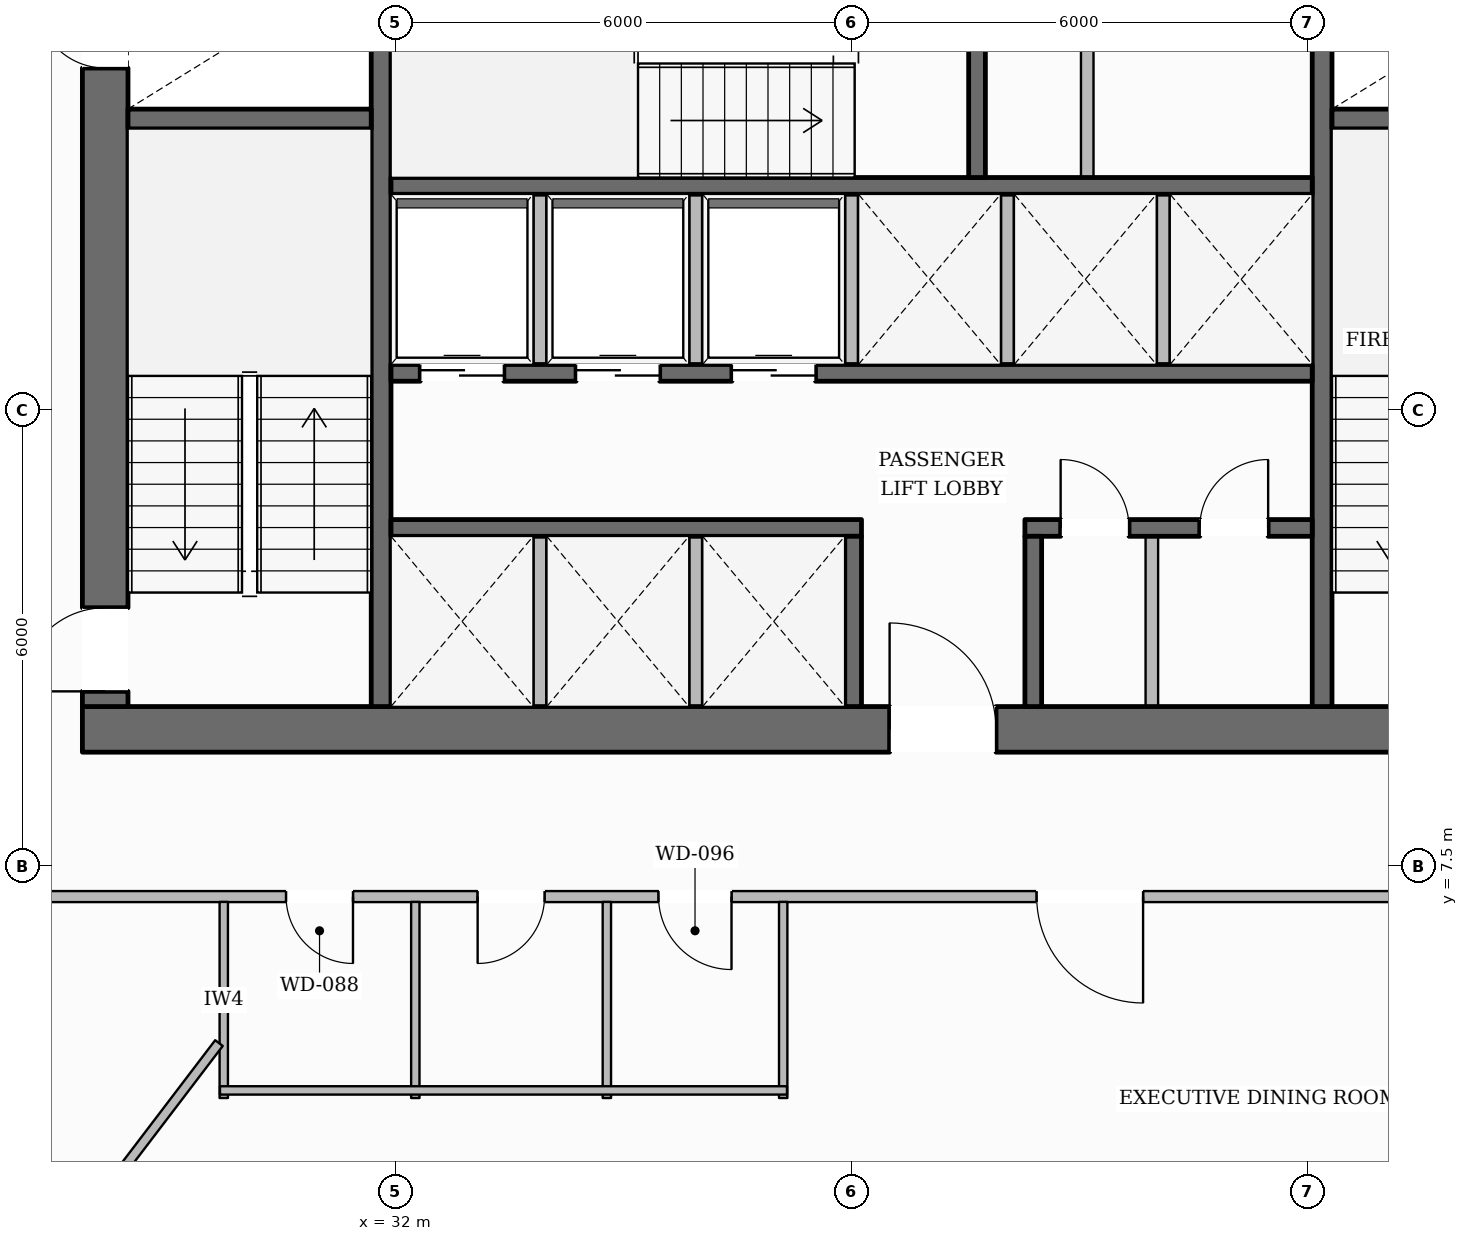
"""IFC4 building model, lengths in metres.
Left out: names, types, materials, properties, quantities, classifications, styles, units other than length and angle.
Written with IfcOpenShell. Run it as: python <this file> out.ifc"""

import sys

from ifc_helpers import new_model, si_unit, direction, frame, frame_2d, origin, place, context, subcontext, project, spatial, rectangle, extrude, element, fill, save


model = new_model("IFC4")
c1 = context("Model", 3, precision=1e-05, world=origin(), true_north=direction((0.0, 1.0)))
c2 = subcontext(c1, "Body", "Model", "MODEL_VIEW")
j1 = project(units=[si_unit("LENGTHUNIT", "METRE"), si_unit("PLANEANGLEUNIT", "RADIAN")], contexts=[c1])
p1 = place(None, origin())
s1 = spatial("IfcSite", under=j1, at=p1, CompositionType="ELEMENT")
p2 = place(p1, origin())
s2 = spatial("IfcBuilding", under=s1, at=p2, CompositionType="ELEMENT")
p3 = place(p2, frame((0.0, 0.0, 48.35)))
s3 = spatial("IfcBuildingStorey", under=s2, at=p3, CompositionType="ELEMENT", Elevation=48.35)
p4 = place(p3, frame((27.88, 9.3, 0.0), z_axis=(0.0, 0.0, 1.0), x_axis=(1.0, 0.0, 0.0)))
e1 = element("IfcWall", 1, at=p4, inside=s3, PredefinedType="SOLIDWALL", context=c2, shape_type="SweptSolid", body=[
    extrude(rectangle(XDim=20.24, YDim=0.6, at=frame_2d((10.12, 0.0))), origin(), (0.0, 0.0, 1.0), 3.59),
])
p5 = place(p4, frame((10.62, 0.0, 0.0)))
e2 = element("IfcOpeningElement", 2, at=p5, cuts=e1, PredefinedType="OPENING", context=c2, shape_type="SweptSolid", body=[
    extrude(rectangle(XDim=1.4, YDim=2.2, at=frame_2d((0.7, 1.1))), frame((0.0, 0.31, 0.0), z_axis=(0.0, -1.0, 0.0), x_axis=(1.0, 0.0, 0.0)), (0.0, 0.0, 1.0), 0.62),
])
p6 = place(p3, frame((28.18, 9.6, 0.0), z_axis=(0.0, 0.0, 1.0), x_axis=(0.0, 1.0, 0.0)))
e3 = element("IfcWall", 3, at=p6, inside=s3, PredefinedType="SOLIDWALL", context=c2, shape_type="SweptSolid", body=[
    extrude(rectangle(XDim=13.0, YDim=0.6, at=frame_2d((6.5, 0.0))), origin(), (0.0, 0.0, 1.0), 3.59),
])
p7 = place(p6, frame((0.2, 0.0, 0.0)))
e4 = element("IfcOpeningElement", 4, at=p7, cuts=e3, PredefinedType="OPENING", context=c2, shape_type="SweptSolid", body=[
    extrude(rectangle(XDim=1.1, YDim=2.15, at=frame_2d((0.55, 1.075))), frame((0.0, 0.31, 0.0), z_axis=(0.0, -1.0, 0.0), x_axis=(1.0, 0.0, 0.0)), (0.0, 0.0, 1.0), 0.62),
])
p8 = place(p6, frame((8.4, 0.0, 0.0)))
e5 = element("IfcOpeningElement", 5, at=p8, cuts=e3, PredefinedType="OPENING", context=c2, shape_type="SweptSolid", body=[
    extrude(rectangle(XDim=0.9, YDim=2.1, at=frame_2d((0.45, 1.05))), frame((0.0, 0.31, 0.0), z_axis=(0.0, -1.0, 0.0), x_axis=(1.0, 0.0, 0.0)), (0.0, 0.0, 1.0), 0.62),
])
p9 = place(p3, frame((31.81, 9.6, 0.0), z_axis=(0.0, 0.0, 1.0), x_axis=(0.0, 1.0, 0.0)))
e6 = element("IfcWall", 6, at=p9, inside=s3, PredefinedType="SHEAR", context=c2, shape_type="SweptSolid", body=[
    extrude(rectangle(XDim=13.0, YDim=0.26, at=frame_2d((6.5, 0.0))), origin(), (0.0, 0.0, 1.0), 3.59),
])
p10 = place(p9, frame((10.925, 0.0, 0.0)))
e7 = element("IfcOpeningElement", 7, at=p10, cuts=e6, PredefinedType="OPENING", context=c2, shape_type="SweptSolid", body=[
    extrude(rectangle(XDim=1.25, YDim=2.25, at=frame_2d((0.625, 1.125))), frame((0.0, 0.14, 0.0), z_axis=(0.0, -1.0, 0.0), x_axis=(1.0, 0.0, 0.0)), (0.0, 0.0, 1.0), 0.28),
])
p11 = place(p3, frame((44.19, 9.6, 0.0), z_axis=(0.0, 0.0, 1.0), x_axis=(0.0, 1.0, 0.0)))
e8 = element("IfcWall", 8, at=p11, inside=s3, PredefinedType="SHEAR", context=c2, shape_type="SweptSolid", body=[
    extrude(rectangle(XDim=13.0, YDim=0.26, at=frame_2d((6.5, 0.0))), origin(), (0.0, 0.0, 1.0), 3.59),
])
p12 = place(p11, frame((10.925, 0.0, 0.0)))
e9 = element("IfcOpeningElement", 9, at=p12, cuts=e8, PredefinedType="OPENING", context=c2, shape_type="SweptSolid", body=[
    extrude(rectangle(XDim=1.25, YDim=2.25, at=frame_2d((0.625, 1.125))), frame((0.0, 0.14, 0.0), z_axis=(0.0, -1.0, 0.0), x_axis=(1.0, 0.0, 0.0)), (0.0, 0.0, 1.0), 0.28),
])
for number, where, z_axis, x_axis in (
    (10, (28.48, 17.33, 0.0), (0.0, 0.0, 1.0), (1.0, 0.0, 0.0)),
    (11, (44.32, 17.33, 0.0), (0.0, 0.0, 1.0), (1.0, 0.0, 0.0)),
):
    element("IfcWall", number, at=place(p3, frame(where, z_axis=z_axis, x_axis=x_axis)), inside=s3, PredefinedType="SHEAR", context=c2, shape_type="SweptSolid", body=[
        extrude(rectangle(XDim=3.2, YDim=0.26, at=frame_2d((1.6, 0.0))), origin(), (0.0, 0.0, 1.0), 3.59),
    ])
p13 = place(p3, frame((31.94, 16.45, 0.0), z_axis=(0.0, 0.0, 1.0), x_axis=(1.0, 0.0, 0.0)))
e12 = element("IfcWall", 12, at=p13, inside=s3, PredefinedType="SOLIDWALL", context=c2, shape_type="SweptSolid", body=[
    extrude(rectangle(XDim=12.12, YDim=0.22, at=frame_2d((6.06, 0.0))), origin(), (0.0, 0.0, 1.0), 3.59),
])
p14 = place(p3, frame((39.65, 16.56, 0.0), z_axis=(0.0, 0.0, 1.0), x_axis=(0.0, 1.0, 0.0)))
e13 = element("IfcWall", 13, at=p14, inside=s3, PredefinedType="SOLIDWALL", context=c2, shape_type="SweptSolid", body=[
    extrude(rectangle(XDim=3.2, YDim=0.22, at=frame_2d((1.6, 0.0))), origin(), (0.0, 0.0, 1.0), 3.59),
])
p15 = place(p3, frame((31.94, 13.99, 0.0), z_axis=(0.0, 0.0, 1.0), x_axis=(1.0, 0.0, 0.0)))
e14 = element("IfcWall", 14, at=p15, inside=s3, PredefinedType="SOLIDWALL", context=c2, shape_type="SweptSolid", body=[
    extrude(rectangle(XDim=12.12, YDim=0.22, at=frame_2d((6.06, 0.0))), origin(), (0.0, 0.0, 1.0), 3.59),
])
p16 = place(p15, frame((0.385, 0.0, 0.0)))
e15 = element("IfcOpeningElement", 15, at=p16, cuts=e14, PredefinedType="OPENING", context=c2, shape_type="SweptSolid", body=[
    extrude(rectangle(XDim=1.1, YDim=2.2, at=frame_2d((0.55, 1.1))), frame((0.0, 0.12, 0.0), z_axis=(0.0, -1.0, 0.0), x_axis=(1.0, 0.0, 0.0)), (0.0, 0.0, 1.0), 0.24),
])
p17 = place(p15, frame((2.435, 0.0, 0.0)))
e16 = element("IfcOpeningElement", 16, at=p17, cuts=e14, PredefinedType="OPENING", context=c2, shape_type="SweptSolid", body=[
    extrude(rectangle(XDim=1.1, YDim=2.2, at=frame_2d((0.55, 1.1))), frame((0.0, 0.12, 0.0), z_axis=(0.0, -1.0, 0.0), x_axis=(1.0, 0.0, 0.0)), (0.0, 0.0, 1.0), 0.24),
])
p18 = place(p15, frame((4.485, 0.0, 0.0)))
e17 = element("IfcOpeningElement", 17, at=p18, cuts=e14, PredefinedType="OPENING", context=c2, shape_type="SweptSolid", body=[
    extrude(rectangle(XDim=1.1, YDim=2.2, at=frame_2d((0.55, 1.1))), frame((0.0, 0.12, 0.0), z_axis=(0.0, -1.0, 0.0), x_axis=(1.0, 0.0, 0.0)), (0.0, 0.0, 1.0), 0.24),
])
p19 = place(p3, frame((31.94, 11.95, 0.0), z_axis=(0.0, 0.0, 1.0), x_axis=(1.0, 0.0, 0.0)))
e18 = element("IfcWall", 18, at=p19, inside=s3, PredefinedType="SOLIDWALL", context=c2, shape_type="SweptSolid", body=[
    extrude(rectangle(XDim=6.19, YDim=0.22, at=frame_2d((3.095, 0.0))), origin(), (0.0, 0.0, 1.0), 3.59),
])
p20 = place(p3, frame((40.28, 11.95, 0.0), z_axis=(0.0, 0.0, 1.0), x_axis=(1.0, 0.0, 0.0)))
e19 = element("IfcWall", 19, at=p20, inside=s3, PredefinedType="SOLIDWALL", context=c2, shape_type="SweptSolid", body=[
    extrude(rectangle(XDim=3.78, YDim=0.22, at=frame_2d((1.89, 0.0))), origin(), (0.0, 0.0, 1.0), 3.59),
])
p21 = place(p20, frame((0.47, 0.0, 0.0)))
e20 = element("IfcOpeningElement", 20, at=p21, cuts=e19, PredefinedType="OPENING", context=c2, shape_type="SweptSolid", body=[
    extrude(rectangle(XDim=0.9, YDim=2.1, at=frame_2d((0.45, 1.05))), frame((0.0, 0.12, 0.0), z_axis=(0.0, -1.0, 0.0), x_axis=(1.0, 0.0, 0.0)), (0.0, 0.0, 1.0), 0.24),
])
p22 = place(p20, frame((2.3, 0.0, 0.0)))
e21 = element("IfcOpeningElement", 21, at=p22, cuts=e19, PredefinedType="OPENING", context=c2, shape_type="SweptSolid", body=[
    extrude(rectangle(XDim=0.9, YDim=2.1, at=frame_2d((0.45, 1.05))), frame((0.0, 0.12, 0.0), z_axis=(0.0, -1.0, 0.0), x_axis=(1.0, 0.0, 0.0)), (0.0, 0.0, 1.0), 0.24),
])
for number, where, z_axis, x_axis in (
    (22, (38.02, 9.6, 0.0), (0.0, 0.0, 1.0), (0.0, 1.0, 0.0)),
    (23, (40.39, 9.6, 0.0), (0.0, 0.0, 1.0), (0.0, 1.0, 0.0)),
):
    element("IfcWall", number, at=place(p3, frame(where, z_axis=z_axis, x_axis=x_axis)), inside=s3, PredefinedType="SOLIDWALL", context=c2, shape_type="SweptSolid", body=[
        extrude(rectangle(XDim=2.24, YDim=0.22, at=frame_2d((1.12, 0.0))), origin(), (0.0, 0.0, 1.0), 3.59),
    ])
p23 = place(p3, frame((13.156, 14.237, 0.0), z_axis=(0.0, 0.0, 1.0), x_axis=(0.499310189151, 0.866423300131, 0.0)))
e24 = element("IfcWall", 24, at=p23, inside=s3, PredefinedType="STANDARD", context=c2, shape_type="SweptSolid", body=[
    extrude(rectangle(XDim=34.917, YDim=0.38, at=frame_2d((17.458, 0.0))), origin(), (0.0, 0.0, 1.0), 2.97),
])
p24 = place(p23, frame((25.588, 0.0, 0.0)))
e25 = element("IfcOpeningElement", 25, at=p24, cuts=e24, PredefinedType="OPENING", context=c2, shape_type="SweptSolid", body=[
    extrude(rectangle(XDim=1.0, YDim=2.2, at=frame_2d((0.5, 1.1))), frame((0.0, 0.2, 0.0), z_axis=(0.0, -1.0, 0.0), x_axis=(1.0, 0.0, 0.0)), (0.0, 0.0, 1.0), 0.4),
])
p25 = place(p23, frame((30.783, 0.0, 0.65)))
e26 = element("IfcOpeningElement", 26, at=p25, cuts=e24, PredefinedType="OPENING", context=c2, shape_type="SweptSolid", body=[
    extrude(rectangle(XDim=1.65, YDim=1.75, at=frame_2d((0.825, 0.875))), frame((0.0, 0.2, 0.0), z_axis=(0.0, -1.0, 0.0), x_axis=(1.0, 0.0, 0.0)), (0.0, 0.0, 1.0), 0.4),
])
p26 = place(p23, frame((8.143, 0.0, 0.65)))
e27 = element("IfcOpeningElement", 27, at=p26, cuts=e24, PredefinedType="OPENING", context=c2, shape_type="SweptSolid", body=[
    extrude(rectangle(XDim=1.65, YDim=1.75, at=frame_2d((0.825, 0.875))), frame((0.0, 0.2, 0.0), z_axis=(0.0, -1.0, 0.0), x_axis=(1.0, 0.0, 0.0)), (0.0, 0.0, 1.0), 0.4),
])
p27 = place(p23, frame((2.483, 0.0, 0.65)))
e28 = element("IfcOpeningElement", 28, at=p27, cuts=e24, PredefinedType="OPENING", context=c2, shape_type="SweptSolid", body=[
    extrude(rectangle(XDim=1.65, YDim=1.75, at=frame_2d((0.825, 0.875))), frame((0.0, 0.2, 0.0), z_axis=(0.0, -1.0, 0.0), x_axis=(1.0, 0.0, 0.0)), (0.0, 0.0, 1.0), 0.4),
])
for number, where, z_axis, x_axis in (
    (29, (33.9, 9.6, 0.0), (0.0, 0.0, 1.0), (0.0, 1.0, 0.0)),
    (30, (35.95, 9.6, 0.0), (0.0, 0.0, 1.0), (0.0, 1.0, 0.0)),
    (31, (33.9, 14.1, 0.0), (0.0, 0.0, 1.0), (0.0, 1.0, 0.0)),
    (32, (35.95, 14.1, 0.0), (0.0, 0.0, 1.0), (0.0, 1.0, 0.0)),
    (33, (38.0, 14.1, 0.0), (0.0, 0.0, 1.0), (0.0, 1.0, 0.0)),
    (34, (40.05, 14.1, 0.0), (0.0, 0.0, 1.0), (0.0, 1.0, 0.0)),
    (35, (42.1, 14.1, 0.0), (0.0, 0.0, 1.0), (0.0, 1.0, 0.0)),
):
    element("IfcWall", number, at=place(p3, frame(where, z_axis=z_axis, x_axis=x_axis)), inside=s3, PredefinedType="PARTITIONING", context=c2, shape_type="SweptSolid", body=[
        extrude(rectangle(XDim=2.24, YDim=0.165, at=frame_2d((1.12, 0.0))), origin(), (0.0, 0.0, 1.0), 3.59),
    ])
p28 = place(p3, frame((41.1, 16.56, 0.0), z_axis=(0.0, 0.0, 1.0), x_axis=(0.0, 1.0, 0.0)))
e36 = element("IfcWall", 36, at=p28, inside=s3, PredefinedType="PARTITIONING", context=c2, shape_type="SweptSolid", body=[
    extrude(rectangle(XDim=3.2, YDim=0.165, at=frame_2d((1.6, 0.0))), origin(), (0.0, 0.0, 1.0), 3.59),
])
p29 = place(p3, frame((41.95, 9.6, 0.0), z_axis=(0.0, 0.0, 1.0), x_axis=(0.0, 1.0, 0.0)))
e37 = element("IfcWall", 37, at=p29, inside=s3, PredefinedType="PARTITIONING", context=c2, shape_type="SweptSolid", body=[
    extrude(rectangle(XDim=2.24, YDim=0.165, at=frame_2d((1.12, 0.0))), origin(), (0.0, 0.0, 1.0), 3.59),
])
p30 = place(p3, frame((49.92, 7.1, 0.0), z_axis=(0.0, 0.0, 1.0), x_axis=(-1.0, 0.0, 0.0)))
e38 = element("IfcWall", 38, at=p30, inside=s3, PredefinedType="PARTITIONING", context=c2, shape_type="SweptSolid", body=[
    extrude(rectangle(XDim=23.84, YDim=0.145, at=frame_2d((11.92, 0.0))), origin(), (0.0, 0.0, 1.0), 3.278),
])
p31 = place(p30, frame((18.48, 0.0, 0.0)))
e39 = element("IfcOpeningElement", 39, at=p31, cuts=e38, PredefinedType="OPENING", context=c2, shape_type="SweptSolid", body=[
    extrude(rectangle(XDim=0.88, YDim=2.1, at=frame_2d((0.44, 1.05))), frame((0.0, 0.083, 0.0), z_axis=(0.0, -1.0, 0.0), x_axis=(1.0, 0.0, 0.0)), (0.0, 0.0, 1.0), 0.165),
])
p32 = place(p30, frame((15.96, 0.0, 0.0)))
e40 = element("IfcOpeningElement", 40, at=p32, cuts=e38, PredefinedType="OPENING", context=c2, shape_type="SweptSolid", body=[
    extrude(rectangle(XDim=0.88, YDim=2.1, at=frame_2d((0.44, 1.05))), frame((0.0, 0.083, 0.0), z_axis=(0.0, -1.0, 0.0), x_axis=(1.0, 0.0, 0.0)), (0.0, 0.0, 1.0), 0.165),
])
p33 = place(p30, frame((13.5, 0.0, 0.0)))
e41 = element("IfcOpeningElement", 41, at=p33, cuts=e38, PredefinedType="OPENING", context=c2, shape_type="SweptSolid", body=[
    extrude(rectangle(XDim=0.96, YDim=2.1, at=frame_2d((0.48, 1.05))), frame((0.0, 0.083, 0.0), z_axis=(0.0, -1.0, 0.0), x_axis=(1.0, 0.0, 0.0)), (0.0, 0.0, 1.0), 0.165),
])
p34 = place(p30, frame((8.085, 0.0, 0.0)))
e42 = element("IfcOpeningElement", 42, at=p34, cuts=e38, PredefinedType="OPENING", context=c2, shape_type="SweptSolid", body=[
    extrude(rectangle(XDim=1.4, YDim=2.2, at=frame_2d((0.7, 1.1))), frame((0.0, 0.083, 0.0), z_axis=(0.0, -1.0, 0.0), x_axis=(1.0, 0.0, 0.0)), (0.0, 0.0, 1.0), 0.165),
])
for number, where, z_axis, x_axis in (
    (43, (29.74, 4.45, 0.0), (0.0, 0.0, 1.0), (0.0, 1.0, 0.0)),
    (44, (32.26, 4.45, 0.0), (0.0, 0.0, 1.0), (0.0, 1.0, 0.0)),
    (45, (34.78, 4.45, 0.0), (0.0, 0.0, 1.0), (0.0, 1.0, 0.0)),
    (46, (37.1, 4.45, 0.0), (0.0, 0.0, 1.0), (0.0, 1.0, 0.0)),
):
    element("IfcWall", number, at=place(p3, frame(where, z_axis=z_axis, x_axis=x_axis)), inside=s3, PredefinedType="PLUMBINGWALL", context=c2, shape_type="SweptSolid", body=[
        extrude(rectangle(XDim=2.58, YDim=0.11, at=frame_2d((1.29, 0.0))), origin(), (0.0, 0.0, 1.0), 3.59),
    ])
p35 = place(p3, frame((29.69, 4.55, 0.0), z_axis=(0.0, 0.0, 1.0), x_axis=(1.0, 0.0, 0.0)))
e47 = element("IfcWall", 47, at=p35, inside=s3, PredefinedType="PLUMBINGWALL", context=c2, shape_type="SweptSolid", body=[
    extrude(rectangle(XDim=7.46, YDim=0.11, at=frame_2d((3.73, 0.0))), origin(), (0.0, 0.0, 1.0), 3.59),
])
p36 = place(p3, frame((29.677, 5.173, 0.0), z_axis=(0.0, 0.0, 1.0), x_axis=(-0.605925707835, -0.795521235785, 0.0)))
e48 = element("IfcWall", 48, at=p36, inside=s3, PredefinedType="PARTITIONING", context=c2, shape_type="SweptSolid", body=[
    extrude(rectangle(XDim=4.069, YDim=0.125, at=frame_2d((2.035, 0.0))), origin(), (0.0, 0.0, 1.0), 3.59),
])
p37 = place(p7, origin())
e49 = element("IfcDoor", 49, at=p37, inside=s3, OperationType="SINGLE_SWING_LEFT", PredefinedType="DOOR", context=c2, shape_type="SweptSolid", body=[
    extrude(rectangle(XDim=1.1, YDim=2.15, at=frame_2d((0.55, 1.075))), frame((0.0, 0.025, 0.0), z_axis=(0.0, -1.0, 0.0), x_axis=(1.0, 0.0, 0.0)), (0.0, 0.0, 1.0), 0.05),
])
fill(e4, e49)
p38 = place(p8, origin())
e50 = element("IfcDoor", 50, at=p38, inside=s3, OperationType="SINGLE_SWING_RIGHT", PredefinedType="DOOR", context=c2, shape_type="SweptSolid", body=[
    extrude(rectangle(XDim=0.9, YDim=2.1, at=frame_2d((0.45, 1.05))), frame((0.0, 0.025, 0.0), z_axis=(0.0, -1.0, 0.0), x_axis=(1.0, 0.0, 0.0)), (0.0, 0.0, 1.0), 0.05),
])
fill(e5, e50)
p39 = place(p5, origin())
e51 = element("IfcDoor", 51, at=p39, inside=s3, OperationType="SINGLE_SWING_LEFT", PredefinedType="DOOR", context=c2, shape_type="SweptSolid", body=[
    extrude(rectangle(XDim=1.4, YDim=2.2, at=frame_2d((0.7, 1.1))), frame((0.0, 0.025, 0.0), z_axis=(0.0, -1.0, 0.0), x_axis=(1.0, 0.0, 0.0)), (0.0, 0.0, 1.0), 0.05),
])
fill(e2, e51)
p40 = place(p16, origin())
e52 = element("IfcDoor", 52, at=p40, inside=s3, OperationType="DOUBLE_DOOR_SLIDING", PredefinedType="DOOR", context=c2, shape_type="SweptSolid", body=[
    extrude(rectangle(XDim=1.1, YDim=2.2, at=frame_2d((0.55, 1.1))), frame((0.0, 0.025, 0.0), z_axis=(0.0, -1.0, 0.0), x_axis=(1.0, 0.0, 0.0)), (0.0, 0.0, 1.0), 0.05),
])
fill(e15, e52)
p41 = place(p17, origin())
e53 = element("IfcDoor", 53, at=p41, inside=s3, OperationType="DOUBLE_DOOR_SLIDING", PredefinedType="DOOR", context=c2, shape_type="SweptSolid", body=[
    extrude(rectangle(XDim=1.1, YDim=2.2, at=frame_2d((0.55, 1.1))), frame((0.0, 0.025, 0.0), z_axis=(0.0, -1.0, 0.0), x_axis=(1.0, 0.0, 0.0)), (0.0, 0.0, 1.0), 0.05),
])
fill(e16, e53)
p42 = place(p18, origin())
e54 = element("IfcDoor", 54, at=p42, inside=s3, OperationType="DOUBLE_DOOR_SLIDING", PredefinedType="DOOR", context=c2, shape_type="SweptSolid", body=[
    extrude(rectangle(XDim=1.1, YDim=2.2, at=frame_2d((0.55, 1.1))), frame((0.0, 0.025, 0.0), z_axis=(0.0, -1.0, 0.0), x_axis=(1.0, 0.0, 0.0)), (0.0, 0.0, 1.0), 0.05),
])
fill(e17, e54)
p43 = place(p21, origin())
e55 = element("IfcDoor", 55, at=p43, inside=s3, OperationType="SINGLE_SWING_LEFT", PredefinedType="DOOR", context=c2, shape_type="SweptSolid", body=[
    extrude(rectangle(XDim=0.9, YDim=2.1, at=frame_2d((0.45, 1.05))), frame((0.0, 0.025, 0.0), z_axis=(0.0, -1.0, 0.0), x_axis=(1.0, 0.0, 0.0)), (0.0, 0.0, 1.0), 0.05),
])
fill(e20, e55)
p44 = place(p22, origin())
e56 = element("IfcDoor", 56, at=p44, inside=s3, OperationType="SINGLE_SWING_RIGHT", PredefinedType="DOOR", context=c2, shape_type="SweptSolid", body=[
    extrude(rectangle(XDim=0.9, YDim=2.1, at=frame_2d((0.45, 1.05))), frame((0.0, 0.025, 0.0), z_axis=(0.0, -1.0, 0.0), x_axis=(1.0, 0.0, 0.0)), (0.0, 0.0, 1.0), 0.05),
])
fill(e21, e56)
p45 = place(p31, origin())
e57 = element("IfcDoor", 57, at=p45, inside=s3, OperationType="SINGLE_SWING_LEFT", PredefinedType="DOOR", context=c2, shape_type="SweptSolid", body=[
    extrude(rectangle(XDim=0.88, YDim=2.1, at=frame_2d((0.44, 1.05))), frame((0.0, 0.025, 0.0), z_axis=(0.0, -1.0, 0.0), x_axis=(1.0, 0.0, 0.0)), (0.0, 0.0, 1.0), 0.05),
])
fill(e39, e57)
p46 = place(p32, origin())
e58 = element("IfcDoor", 58, at=p46, inside=s3, OperationType="SINGLE_SWING_RIGHT", PredefinedType="DOOR", context=c2, shape_type="SweptSolid", body=[
    extrude(rectangle(XDim=0.88, YDim=2.1, at=frame_2d((0.44, 1.05))), frame((0.0, 0.025, 0.0), z_axis=(0.0, -1.0, 0.0), x_axis=(1.0, 0.0, 0.0)), (0.0, 0.0, 1.0), 0.05),
])
fill(e40, e58)
p47 = place(p33, origin())
e59 = element("IfcDoor", 59, at=p47, inside=s3, OperationType="SINGLE_SWING_LEFT", PredefinedType="DOOR", context=c2, shape_type="SweptSolid", body=[
    extrude(rectangle(XDim=0.96, YDim=2.1, at=frame_2d((0.48, 1.05))), frame((0.0, 0.025, 0.0), z_axis=(0.0, -1.0, 0.0), x_axis=(1.0, 0.0, 0.0)), (0.0, 0.0, 1.0), 0.05),
])
fill(e41, e59)
p48 = place(p34, origin())
e60 = element("IfcDoor", 60, at=p48, inside=s3, OperationType="SINGLE_SWING_LEFT", PredefinedType="DOOR", context=c2, shape_type="SweptSolid", body=[
    extrude(rectangle(XDim=1.4, YDim=2.2, at=frame_2d((0.7, 1.1))), frame((0.0, 0.025, 0.0), z_axis=(0.0, -1.0, 0.0), x_axis=(1.0, 0.0, 0.0)), (0.0, 0.0, 1.0), 0.05),
])
fill(e42, e60)
save(model, sys.argv[1])
